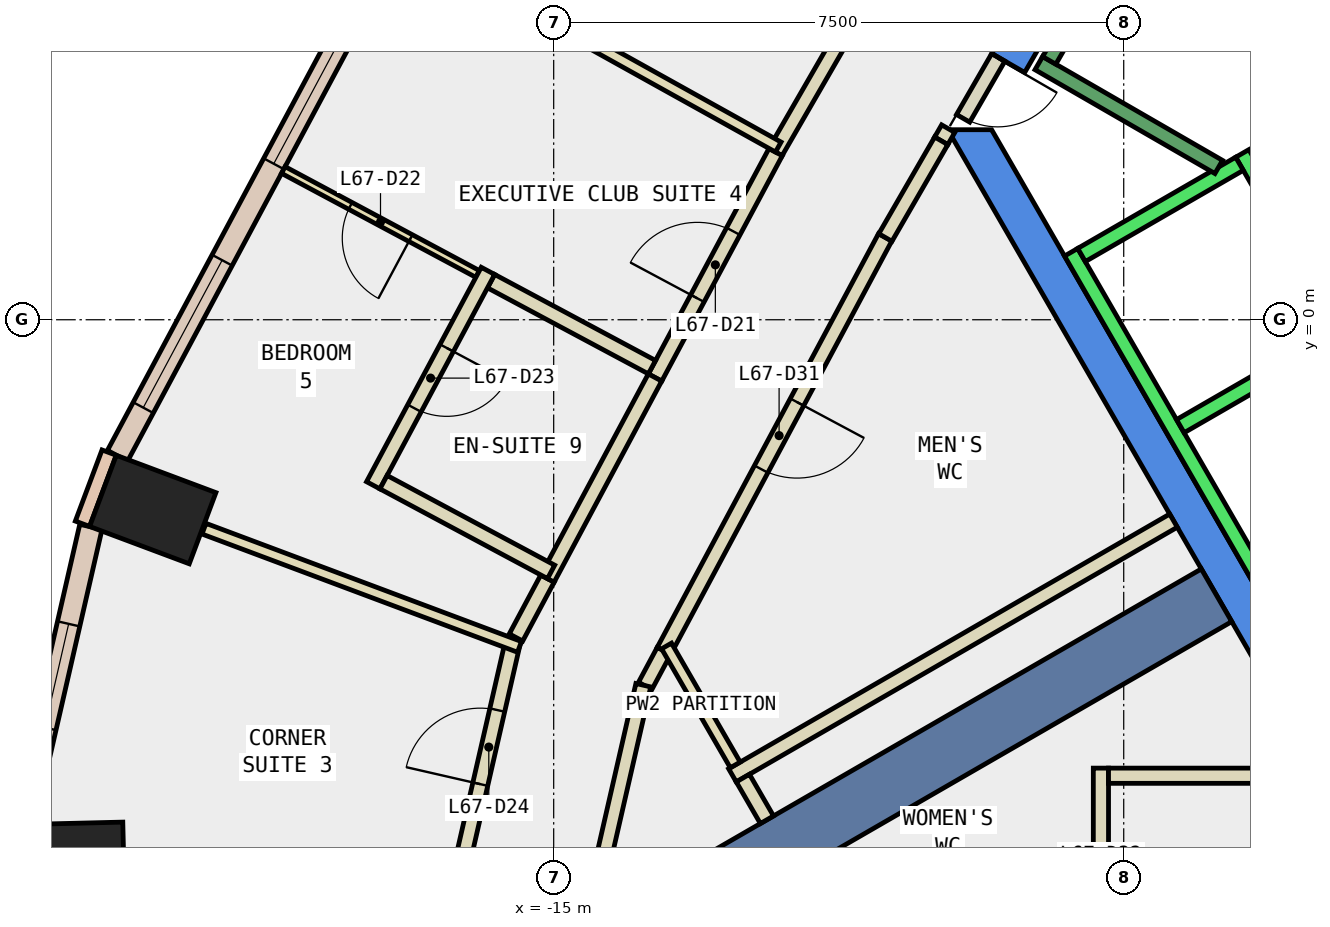
"""IFC4 building model, lengths in metres.
Left out: names, types, materials, properties, quantities, classifications, styles, units other than length and angle.
Written with IfcOpenShell. Run it as: python <this file> out.ifc"""

import sys

from ifc_helpers import new_model, si_unit, direction, frame, frame_2d, origin, origin_2d, place, context, subcontext, project, spatial, polyline, rectangle, outline, extrude, element, fill, save


model = new_model("IFC4")
c1 = context("Model", 3, precision=1e-05, world=origin(), true_north=direction((0.0, 1.0)))
c2 = subcontext(c1, "Body", "Model", "MODEL_VIEW")
j1 = project(units=[si_unit("LENGTHUNIT", "METRE"), si_unit("PLANEANGLEUNIT", "RADIAN")], contexts=[c1])
p1 = place(None, origin())
s1 = spatial("IfcSite", under=j1, at=p1, CompositionType="ELEMENT")
p2 = place(p1, origin())
s2 = spatial("IfcBuilding", under=s1, at=p2, CompositionType="ELEMENT")
p3 = place(p2, frame((0.0, 0.0, 290.0)))
s3 = spatial("IfcBuildingStorey", under=s2, at=p3, CompositionType="ELEMENT", Elevation=290.0)
for number, where, z_axis, x_axis in (
    (1, (-20.275, -2.497, -0.34), (0.0, 0.0, 1.0), (0.351, 0.936, 0.0)),
    (2, (-21.357, -7.126, -0.34), (0.0, 0.0, 1.0), (-0.024, 1.0, 0.0)),
):
    element("IfcColumn", number, at=place(p3, frame(where, z_axis=z_axis, x_axis=x_axis)), inside=s3, PredefinedType="COLUMN", context=c2, shape_type="SweptSolid", body=[
        extrude(rectangle(XDim=1.0, YDim=1.4, at=origin_2d()), origin(), (0.0, 0.0, 1.0), 3.6),
    ])
p4 = place(p3, frame((0.0, 0.0, -0.34)))
e3 = element("IfcWall", 3, at=p4, inside=s3, PredefinedType="SHEAR", context=c2, shape_type="SweptSolid", body=[
    extrude(outline(polyline([(-9.236, 3.502), (-8.803, 3.253), (-4.619, 10.5), (-4.907, 11.0), (-9.236, 3.502)])), origin(), (0.0, 0.0, 1.0), 3.6),
])
p5 = place(p3, frame((0.0, 0.0, -0.34)))
e4 = element("IfcWall", 4, at=p5, inside=s3, PredefinedType="SHEAR", context=c2, shape_type="SweptSolid", body=[
    extrude(outline(polyline([(-9.815, 2.5), (-4.907, -6.0), (-4.619, -5.5), (-9.238, 2.5), (-9.815, 2.5)])), origin(), (0.0, 0.0, 1.0), 3.6),
])
p6 = place(p3, frame((-6.279, -3.625, -0.34), z_axis=(0.0, 0.0, 1.0), x_axis=(-0.866017533419, -0.500013631625, 0.0)))
e5 = element("IfcWall", 5, at=p6, inside=s3, PredefinedType="SHEAR", context=c2, shape_type="SweptSolid", body=[
    extrude(rectangle(XDim=9.0, YDim=0.8, at=frame_2d((4.5, 0.0))), origin(), (0.0, 0.0, 1.0), 3.6),
])
p7 = place(p3, frame((-20.849, -1.748, 0.0), z_axis=(0.0, 0.0, 1.0), x_axis=(-0.350962844851, -0.936389385637, 0.0)))
e6 = element("IfcWall", 6, at=p7, inside=s3, PredefinedType="STANDARD", context=c2, shape_type="SweptSolid", body=[
    extrude(rectangle(XDim=1.0, YDim=0.2, at=frame_2d((0.5, 0.0))), origin(), (0.0, 0.0, 1.0), 3.26),
])
p8 = place(p3, frame((-17.306, 4.626, 0.0), z_axis=(0.0, 0.0, 1.0), x_axis=(-0.471789353675, -0.881711293882, 0.0)))
e7 = element("IfcWall", 7, at=p8, inside=s3, PredefinedType="STANDARD", context=c2, shape_type="SweptSolid", body=[
    extrude(rectangle(XDim=7.277, YDim=0.3, at=frame_2d((3.638, 0.0))), origin(), (0.0, 0.0, 1.0), 3.26),
])
p9 = place(p8, frame((0.719, 0.0, 0.9)))
e8 = element("IfcOpeningElement", 8, at=p9, cuts=e7, PredefinedType="OPENING", context=c2, shape_type="SweptSolid", body=[
    extrude(rectangle(XDim=2.2, YDim=2.0, at=frame_2d((1.1, 1.0))), frame((0.0, 0.16, 0.0), z_axis=(0.0, -1.0, 0.0), x_axis=(1.0, 0.0, 0.0)), (0.0, 0.0, 1.0), 0.32),
])
p10 = place(p8, frame((4.358, 0.0, 0.9)))
e9 = element("IfcOpeningElement", 9, at=p10, cuts=e7, PredefinedType="OPENING", context=c2, shape_type="SweptSolid", body=[
    extrude(rectangle(XDim=2.2, YDim=2.0, at=frame_2d((1.1, 1.0))), frame((0.0, 0.16, 0.0), z_axis=(0.0, -1.0, 0.0), x_axis=(1.0, 0.0, 0.0)), (0.0, 0.0, 1.0), 0.32),
])
p11 = place(p3, frame((-21.089, -2.725, 0.0), z_axis=(0.0, 0.0, 1.0), x_axis=(-0.223448307338, -0.974715781112, 0.0)))
e10 = element("IfcWall", 10, at=p11, inside=s3, PredefinedType="STANDARD", context=c2, shape_type="SweptSolid", body=[
    extrude(rectangle(XDim=4.019, YDim=0.3, at=frame_2d((2.009, 0.0))), origin(), (0.0, 0.0, 1.0), 3.26),
])
p12 = place(p11, frame((1.309, 0.0, 0.9)))
e11 = element("IfcOpeningElement", 11, at=p12, cuts=e10, PredefinedType="OPENING", context=c2, shape_type="SweptSolid", body=[
    extrude(rectangle(XDim=1.4, YDim=2.0, at=frame_2d((0.7, 1.0))), frame((0.0, 0.16, 0.0), z_axis=(0.0, -1.0, 0.0), x_axis=(1.0, 0.0, 0.0)), (0.0, 0.0, 1.0), 0.32),
])
p13 = place(p3, frame((-9.809, 2.514, 0.0), z_axis=(0.0, 0.0, 1.0), x_axis=(-0.497849076449, -0.867263683708, 0.0)))
e12 = element("IfcWall", 12, at=p13, inside=s3, PredefinedType="PARTITIONING", context=c2, shape_type="SweptSolid", body=[
    extrude(rectangle(XDim=0.184, YDim=0.2, at=frame_2d((0.092, 0.0))), origin(), (0.0, 0.0, 1.0), 2.4),
])
p14 = place(p3, frame((-10.639, 1.084, 0.0), z_axis=(0.0, 0.0, 1.0), x_axis=(-0.471696599276, -0.881760918975, 0.0)))
e13 = element("IfcWall", 13, at=p14, inside=s3, PredefinedType="PARTITIONING", context=c2, shape_type="SweptSolid", body=[
    extrude(rectangle(XDim=6.172, YDim=0.2, at=frame_2d((3.086, 0.0))), origin(), (0.0, 0.0, 1.0), 3.26),
])
p15 = place(p14, frame((2.458, 0.0, 0.0)))
e14 = element("IfcOpeningElement", 14, at=p15, cuts=e13, PredefinedType="OPENING", context=c2, shape_type="SweptSolid", body=[
    extrude(rectangle(XDim=1.0, YDim=2.1, at=frame_2d((0.5, 1.05))), frame((0.0, 0.11, 0.0), z_axis=(0.0, -1.0, 0.0), x_axis=(1.0, 0.0, 0.0)), (0.0, 0.0, 1.0), 0.22),
])
p16 = place(p3, frame((-13.55, -4.358, 0.0), z_axis=(0.0, 0.0, 1.0), x_axis=(-0.472169364753, -0.881507850781, 0.0)))
e15 = element("IfcWall", 15, at=p16, inside=s3, PredefinedType="PARTITIONING", context=c2, shape_type="SweptSolid", body=[
    extrude(rectangle(XDim=0.521, YDim=0.2, at=frame_2d((0.26, 0.0))), origin(), (0.0, 0.0, 1.0), 3.26),
])
p17 = place(p3, frame((-13.821, -4.808, 0.0), z_axis=(0.0, 0.0, 1.0), x_axis=(-0.223248099856, -0.97476165595, 0.0)))
e16 = element("IfcWall", 16, at=p17, inside=s3, PredefinedType="PARTITIONING", context=c2, shape_type="SweptSolid", body=[
    extrude(rectangle(XDim=2.302, YDim=0.2, at=frame_2d((1.151, 0.0))), origin(), (0.0, 0.0, 1.0), 3.26),
])
p18 = place(p3, frame((-12.082, 2.207, 0.0), z_axis=(0.0, 0.0, 1.0), x_axis=(0.500123454404, 0.865954115618, 0.0)))
e17 = element("IfcWall", 17, at=p18, inside=s3, PredefinedType="PARTITIONING", context=c2, shape_type="SweptSolid", body=[
    extrude(rectangle(XDim=5.885, YDim=0.2, at=frame_2d((2.942, 0.0))), origin(), (0.0, 0.0, 1.0), 3.26),
])
p19 = place(p18, frame((2.493, 0.0, 0.0)))
e18 = element("IfcOpeningElement", 18, at=p19, cuts=e17, PredefinedType="OPENING", context=c2, shape_type="SweptSolid", body=[
    extrude(rectangle(XDim=1.0, YDim=2.1, at=frame_2d((0.5, 1.05))), frame((0.0, 0.11, 0.0), z_axis=(0.0, -1.0, 0.0), x_axis=(1.0, 0.0, 0.0)), (0.0, 0.0, 1.0), 0.22),
])
p20 = place(p3, frame((-13.666, -0.76, 0.0), z_axis=(0.0, 0.0, 1.0), x_axis=(0.471643060173, 0.881789557543, 0.0)))
e19 = element("IfcWall", 19, at=p20, inside=s3, PredefinedType="PARTITIONING", context=c2, shape_type="SweptSolid", body=[
    extrude(rectangle(XDim=3.363, YDim=0.2, at=frame_2d((1.681, 0.0))), origin(), (0.0, 0.0, 1.0), 3.26),
])
p21 = place(p20, frame((1.181, 0.0, 0.0)))
e20 = element("IfcOpeningElement", 20, at=p21, cuts=e19, PredefinedType="OPENING", context=c2, shape_type="SweptSolid", body=[
    extrude(rectangle(XDim=1.0, YDim=2.1, at=frame_2d((0.5, 1.05))), frame((0.0, 0.11, 0.0), z_axis=(0.0, -1.0, 0.0), x_axis=(1.0, 0.0, 0.0)), (0.0, 0.0, 1.0), 0.22),
])
p22 = place(p3, frame((-15.496, -4.18, 0.0), z_axis=(0.0, 0.0, 1.0), x_axis=(0.471280380621, 0.881983448167, 0.0)))
e21 = element("IfcWall", 21, at=p22, inside=s3, PredefinedType="PARTITIONING", context=c2, shape_type="SweptSolid", body=[
    extrude(rectangle(XDim=0.879, YDim=0.2, at=frame_2d((0.439, 0.0))), origin(), (0.0, 0.0, 1.0), 3.26),
])
p23 = place(p3, frame((-15.082, -3.405, 0.0), z_axis=(0.0, 0.0, 1.0), x_axis=(0.471719946084, 0.88174842924, 0.0)))
e22 = element("IfcWall", 22, at=p23, inside=s3, PredefinedType="PARTITIONING", context=c2, shape_type="SweptSolid", body=[
    extrude(rectangle(XDim=3.0, YDim=0.2, at=frame_2d((1.5, 0.0))), origin(), (0.0, 0.0, 1.0), 3.26),
])
p24 = place(p3, frame((-16.192, -7.098, 0.0), z_axis=(0.0, 0.0, 1.0), x_axis=(0.22330023395, 0.974749714295, 0.0)))
e23 = element("IfcWall", 23, at=p24, inside=s3, PredefinedType="PARTITIONING", context=c2, shape_type="SweptSolid", body=[
    extrude(rectangle(XDim=2.928, YDim=0.2, at=frame_2d((1.464, 0.0))), origin(), (0.0, 0.0, 1.0), 3.26),
])
p25 = place(p24, frame((1.014, 0.0, 0.0)))
e24 = element("IfcOpeningElement", 24, at=p25, cuts=e23, PredefinedType="OPENING", context=c2, shape_type="SweptSolid", body=[
    extrude(rectangle(XDim=1.0, YDim=2.1, at=frame_2d((0.5, 1.05))), frame((0.0, 0.11, 0.0), z_axis=(0.0, -1.0, 0.0), x_axis=(1.0, 0.0, 0.0)), (0.0, 0.0, 1.0), 0.22),
])
p26 = place(p3, frame((-7.8, -9.775, 0.0), z_axis=(0.0, 0.0, 1.0), x_axis=(0.0, 1.0, 0.0)))
e25 = element("IfcWall", 25, at=p26, inside=s3, PredefinedType="PARTITIONING", context=c2, shape_type="SweptSolid", body=[
    extrude(rectangle(XDim=3.876, YDim=0.2, at=frame_2d((1.938, 0.0))), origin(), (0.0, 0.0, 1.0), 3.26),
])
p27 = place(p26, frame((1.438, 0.0, 0.0)))
e26 = element("IfcOpeningElement", 26, at=p27, cuts=e25, PredefinedType="OPENING", context=c2, shape_type="SweptSolid", body=[
    extrude(rectangle(XDim=1.0, YDim=2.1, at=frame_2d((0.5, 1.05))), frame((0.0, 0.11, 0.0), z_axis=(0.0, -1.0, 0.0), x_axis=(1.0, 0.0, 0.0)), (0.0, 0.0, 1.0), 0.22),
])
p28 = place(p3, frame((-7.7, -5.999, 0.0), z_axis=(0.0, 0.0, 1.0), x_axis=(1.0, 0.0, 0.0)))
e27 = element("IfcWall", 27, at=p28, inside=s3, PredefinedType="PARTITIONING", context=c2, shape_type="SweptSolid", body=[
    extrude(rectangle(XDim=2.792, YDim=0.2, at=frame_2d((1.396, 0.0))), origin(), (0.0, 0.0, 1.0), 3.26),
])
p29 = place(p3, frame((-6.845, -2.643, 0.0), z_axis=(0.0, 0.0, 1.0), x_axis=(-0.865994457699, -0.500053596362, 0.0)))
e28 = element("IfcWall", 28, at=p29, inside=s3, PredefinedType="PARTITIONING", context=c2, shape_type="SweptSolid", body=[
    extrude(rectangle(XDim=6.701, YDim=0.2, at=frame_2d((3.351, 0.0))), origin(), (0.0, 0.0, 1.0), 3.26),
])
p30 = place(p3, frame((-12.611, -5.857, 0.0), z_axis=(0.0, 0.0, 1.0), x_axis=(-0.500120037633, 0.865956088932, 0.0)))
e29 = element("IfcWall", 29, at=p30, inside=s3, PredefinedType="PARTITIONING", context=c2, shape_type="SweptSolid", body=[
    extrude(rectangle(XDim=1.807, YDim=0.15, at=frame_2d((0.904, 0.0))), origin(), (0.0, 0.0, 1.0), 3.26),
])
p31 = place(p3, frame((-12.045, 2.272, 0.0), z_axis=(0.0, 0.0, 1.0), x_axis=(-0.873982340973, 0.485957680943, 0.0)))
e30 = element("IfcWall", 30, at=p31, inside=s3, PredefinedType="PARTITIONING", context=c2, shape_type="SweptSolid", body=[
    extrude(rectangle(XDim=4.28, YDim=0.15, at=frame_2d((2.14, 0.0))), origin(), (0.0, 0.0, 1.0), 3.26),
])
p32 = place(p3, frame((-16.0, 0.602, 0.0), z_axis=(0.0, 0.0, 1.0), x_axis=(-0.881743923375, 0.47172836844, 0.0)))
e31 = element("IfcWall", 31, at=p32, inside=s3, PredefinedType="PARTITIONING", context=c2, shape_type="SweptSolid", body=[
    extrude(rectangle(XDim=2.9, YDim=0.1, at=frame_2d((1.45, 0.0))), origin(), (0.0, 0.0, 1.0), 3.26),
])
p33 = place(p32, frame((1.0, 0.0, 0.0)))
e32 = element("IfcOpeningElement", 32, at=p33, cuts=e31, PredefinedType="OPENING", context=c2, shape_type="SweptSolid", body=[
    extrude(rectangle(XDim=0.9, YDim=2.1, at=frame_2d((0.45, 1.05))), frame((0.0, 0.06, 0.0), z_axis=(0.0, -1.0, 0.0), x_axis=(1.0, 0.0, 0.0)), (0.0, 0.0, 1.0), 0.12),
])
p34 = place(p3, frame((-13.707, -0.624, 0.0), z_axis=(0.0, 0.0, 1.0), x_axis=(-0.881825950813, 0.471575012562, 0.0)))
e33 = element("IfcWall", 33, at=p34, inside=s3, PredefinedType="PARTITIONING", context=c2, shape_type="SweptSolid", body=[
    extrude(rectangle(XDim=2.401, YDim=0.2, at=frame_2d((1.2, 0.0))), origin(), (0.0, 0.0, 1.0), 3.26),
])
p35 = place(p3, frame((-15.865, 0.643, 0.0), z_axis=(0.0, 0.0, 1.0), x_axis=(-0.471677088066, -0.881771356188, 0.0)))
e34 = element("IfcWall", 34, at=p35, inside=s3, PredefinedType="PARTITIONING", context=c2, shape_type="SweptSolid", body=[
    extrude(rectangle(XDim=3.199, YDim=0.2, at=frame_2d((1.6, 0.0))), origin(), (0.0, 0.0, 1.0), 3.26),
])
p36 = place(p35, frame((1.15, 0.0, 0.0)))
e35 = element("IfcOpeningElement", 35, at=p36, cuts=e34, PredefinedType="OPENING", context=c2, shape_type="SweptSolid", body=[
    extrude(rectangle(XDim=0.9, YDim=2.1, at=frame_2d((0.45, 1.05))), frame((0.0, 0.11, 0.0), z_axis=(0.0, -1.0, 0.0), x_axis=(1.0, 0.0, 0.0)), (0.0, 0.0, 1.0), 0.22),
])
p37 = place(p3, frame((-17.239, -2.137, 0.0), z_axis=(0.0, 0.0, 1.0), x_axis=(0.881706262609, -0.471798756332, 0.0)))
e36 = element("IfcWall", 36, at=p37, inside=s3, PredefinedType="PARTITIONING", context=c2, shape_type="SweptSolid", body=[
    extrude(rectangle(XDim=2.501, YDim=0.2, at=frame_2d((1.25, 0.0))), origin(), (0.0, 0.0, 1.0), 3.26),
])
p38 = place(p3, frame((-15.45, -4.304, 0.0), z_axis=(0.0, 0.0, 1.0), x_axis=(-0.936458128132, 0.350779381172, 0.0)))
e37 = element("IfcWall", 37, at=p38, inside=s3, PredefinedType="PARTITIONING", context=c2, shape_type="SweptSolid", body=[
    extrude(rectangle(XDim=4.433, YDim=0.15, at=frame_2d((2.216, 0.0))), origin(), (0.0, 0.0, 1.0), 3.26),
])
p39 = place(p3, frame((-9.15, 3.452, 0.0), z_axis=(0.0, 0.0, 1.0), x_axis=(-0.500079945886, -0.865979242085, 0.0)))
e38 = element("IfcWall", 38, at=p39, inside=s3, PredefinedType="PARTITIONING", context=c2, shape_type="SweptSolid", body=[
    extrude(rectangle(XDim=0.926, YDim=0.2, at=frame_2d((0.463, 0.0))), origin(), (0.0, 0.0, 1.0), 2.4),
])
p40 = place(p39, frame((0.017, 0.0, 0.0)))
e39 = element("IfcOpeningElement", 39, at=p40, cuts=e38, PredefinedType="OPENING", context=c2, shape_type="SweptSolid", body=[
    extrude(rectangle(XDim=0.9, YDim=2.1, at=frame_2d((0.45, 1.05))), frame((0.0, 0.11, 0.0), z_axis=(0.0, -1.0, 0.0), x_axis=(1.0, 0.0, 0.0)), (0.0, 0.0, 1.0), 0.22),
])
p41 = place(p3, frame((-12.194, -6.578, 0.0), z_axis=(0.0, 0.0, 1.0), x_axis=(-0.500701704226, 0.865619895442, 0.0)))
e40 = element("IfcWall", 40, at=p41, inside=s3, PredefinedType="PARTITIONING", context=c2, shape_type="SweptSolid", body=[
    extrude(rectangle(XDim=0.633, YDim=0.2, at=frame_2d((0.316, 0.0))), origin(), (0.0, 0.0, 1.0), 3.26),
])
p42 = place(p3, frame((-9.901, 2.354, 0.0), z_axis=(0.0, 0.0, 1.0), x_axis=(-0.500374498448, -0.865809079014, 0.0)))
e41 = element("IfcWall", 41, at=p42, inside=s3, PredefinedType="PARTITIONING", context=c2, shape_type="SweptSolid", body=[
    extrude(rectangle(XDim=1.469, YDim=0.2, at=frame_2d((0.734, 0.0))), origin(), (0.0, 0.0, 1.0), 3.26),
])
p43 = place(p3, frame((-5.94, 2.188, 0.0), z_axis=(0.0, 0.0, 1.0), x_axis=(0.500034260056, -0.866005622828, 0.0)))
e42 = element("IfcWall", 42, at=p43, inside=s3, PredefinedType="STANDARD", context=c2, shape_type="SweptSolid", body=[
    extrude(rectangle(XDim=5.399, YDim=0.2, at=frame_2d((2.7, 0.0))), origin(), (0.0, 0.0, 1.0), 3.26),
])
p44 = place(p43, frame((3.075, 0.0, 0.0)))
e43 = element("IfcOpeningElement", 43, at=p44, cuts=e42, PredefinedType="OPENING", context=c2, shape_type="SweptSolid", body=[
    extrude(rectangle(XDim=1.1, YDim=2.1, at=frame_2d((0.55, 1.05))), frame((0.0, 0.11, 0.0), z_axis=(0.0, -1.0, 0.0), x_axis=(1.0, 0.0, 0.0)), (0.0, 0.0, 1.0), 0.22),
])
p45 = place(p43, frame((1.225, 0.0, 0.0)))
e44 = element("IfcOpeningElement", 44, at=p45, cuts=e42, PredefinedType="OPENING", context=c2, shape_type="SweptSolid", body=[
    extrude(rectangle(XDim=1.1, YDim=2.1, at=frame_2d((0.55, 1.05))), frame((0.0, 0.11, 0.0), z_axis=(0.0, -1.0, 0.0), x_axis=(1.0, 0.0, 0.0)), (0.0, 0.0, 1.0), 0.22),
])
p46 = place(p3, frame((-8.192, 0.888, 0.0), z_axis=(0.0, 0.0, 1.0), x_axis=(0.500034260056, -0.866005622828, 0.0)))
e45 = element("IfcWall", 45, at=p46, inside=s3, PredefinedType="STANDARD", context=c2, shape_type="SweptSolid", body=[
    extrude(rectangle(XDim=5.399, YDim=0.2, at=frame_2d((2.7, 0.0))), origin(), (0.0, 0.0, 1.0), 3.26),
])
for number, where, z_axis, x_axis in (
    (46, (-5.977, 2.052, 0.0), (0.0, 0.0, 1.0), (-0.866, -0.5, 0.0)),
    (47, (-4.677, -0.2, 0.0), (0.0, 0.0, 1.0), (-0.866, -0.5, 0.0)),
):
    element("IfcWall", number, at=place(p3, frame(where, z_axis=z_axis, x_axis=x_axis)), inside=s3, PredefinedType="STANDARD", context=c2, shape_type="SweptSolid", body=[
        extrude(rectangle(XDim=2.399, YDim=0.2, at=frame_2d((1.2, 0.0))), origin(), (0.0, 0.0, 1.0), 3.26),
    ])
p47 = place(p3, frame((-6.25, 2.01, 0.0), z_axis=(0.0, 0.0, 1.0), x_axis=(-0.86611865017, 0.499838457731, 0.0)))
e48 = element("IfcWall", 48, at=p47, inside=s3, PredefinedType="STANDARD", context=c2, shape_type="SweptSolid", body=[
    extrude(rectangle(XDim=2.733, YDim=0.2, at=frame_2d((1.366, 0.0))), origin(), (0.0, 0.0, 1.0), 3.26),
])
p48 = place(p3, frame((-5.03, 9.388, 0.0), z_axis=(0.0, 0.0, 1.0), x_axis=(-0.499978703459, -0.866037698999, 0.0)))
e49 = element("IfcWall", 49, at=p48, inside=s3, PredefinedType="STANDARD", context=c2, shape_type="SweptSolid", body=[
    extrude(rectangle(XDim=6.9, YDim=0.2, at=frame_2d((3.45, 0.0))), origin(), (0.0, 0.0, 1.0), 3.26),
])
p49 = place(p9, origin())
e50 = element("IfcWindow", 50, at=p49, inside=s3, PartitioningType="SINGLE_PANEL", PredefinedType="WINDOW", context=c2, shape_type="SweptSolid", body=[
    extrude(rectangle(XDim=2.2, YDim=2.0, at=frame_2d((1.1, 1.0))), frame((0.0, 0.03, 0.0), z_axis=(0.0, -1.0, 0.0), x_axis=(1.0, 0.0, 0.0)), (0.0, 0.0, 1.0), 0.06),
])
fill(e8, e50)
p50 = place(p10, origin())
e51 = element("IfcWindow", 51, at=p50, inside=s3, PartitioningType="SINGLE_PANEL", PredefinedType="WINDOW", context=c2, shape_type="SweptSolid", body=[
    extrude(rectangle(XDim=2.2, YDim=2.0, at=frame_2d((1.1, 1.0))), frame((0.0, 0.03, 0.0), z_axis=(0.0, -1.0, 0.0), x_axis=(1.0, 0.0, 0.0)), (0.0, 0.0, 1.0), 0.06),
])
fill(e9, e51)
p51 = place(p12, origin())
e52 = element("IfcWindow", 52, at=p51, inside=s3, PartitioningType="SINGLE_PANEL", PredefinedType="WINDOW", context=c2, shape_type="SweptSolid", body=[
    extrude(rectangle(XDim=1.4, YDim=2.0, at=frame_2d((0.7, 1.0))), frame((0.0, 0.03, 0.0), z_axis=(0.0, -1.0, 0.0), x_axis=(1.0, 0.0, 0.0)), (0.0, 0.0, 1.0), 0.06),
])
fill(e11, e52)
p52 = place(p21, origin())
e53 = element("IfcDoor", 53, at=p52, inside=s3, OperationType="SINGLE_SWING_LEFT", PredefinedType="DOOR", context=c2, shape_type="SweptSolid", body=[
    extrude(rectangle(XDim=1.0, YDim=2.1, at=frame_2d((0.5, 1.05))), frame((0.0, 0.025, 0.0), z_axis=(0.0, -1.0, 0.0), x_axis=(1.0, 0.0, 0.0)), (0.0, 0.0, 1.0), 0.05),
])
fill(e20, e53)
p53 = place(p33, origin())
e54 = element("IfcDoor", 54, at=p53, inside=s3, OperationType="SINGLE_SWING_LEFT", PredefinedType="DOOR", context=c2, shape_type="SweptSolid", body=[
    extrude(rectangle(XDim=0.9, YDim=2.1, at=frame_2d((0.45, 1.05))), frame((0.0, 0.025, 0.0), z_axis=(0.0, -1.0, 0.0), x_axis=(1.0, 0.0, 0.0)), (0.0, 0.0, 1.0), 0.05),
])
fill(e32, e54)
p54 = place(p36, origin())
e55 = element("IfcDoor", 55, at=p54, inside=s3, OperationType="SINGLE_SWING_LEFT", PredefinedType="DOOR", context=c2, shape_type="SweptSolid", body=[
    extrude(rectangle(XDim=0.9, YDim=2.1, at=frame_2d((0.45, 1.05))), frame((0.0, 0.025, 0.0), z_axis=(0.0, -1.0, 0.0), x_axis=(1.0, 0.0, 0.0)), (0.0, 0.0, 1.0), 0.05),
])
fill(e35, e55)
p55 = place(p25, origin())
e56 = element("IfcDoor", 56, at=p55, inside=s3, OperationType="SINGLE_SWING_LEFT", PredefinedType="DOOR", context=c2, shape_type="SweptSolid", body=[
    extrude(rectangle(XDim=1.0, YDim=2.1, at=frame_2d((0.5, 1.05))), frame((0.0, 0.025, 0.0), z_axis=(0.0, -1.0, 0.0), x_axis=(1.0, 0.0, 0.0)), (0.0, 0.0, 1.0), 0.05),
])
fill(e24, e56)
p56 = place(p15, origin())
e57 = element("IfcDoor", 57, at=p56, inside=s3, OperationType="SINGLE_SWING_LEFT", PredefinedType="DOOR", context=c2, shape_type="SweptSolid", body=[
    extrude(rectangle(XDim=1.0, YDim=2.1, at=frame_2d((0.5, 1.05))), frame((0.0, 0.025, 0.0), z_axis=(0.0, -1.0, 0.0), x_axis=(1.0, 0.0, 0.0)), (0.0, 0.0, 1.0), 0.05),
])
fill(e14, e57)
p57 = place(p40, origin())
e58 = element("IfcDoor", 58, at=p57, inside=s3, OperationType="SINGLE_SWING_LEFT", PredefinedType="DOOR", context=c2, shape_type="SweptSolid", body=[
    extrude(rectangle(XDim=0.9, YDim=2.1, at=frame_2d((0.45, 1.05))), frame((0.0, 0.025, 0.0), z_axis=(0.0, -1.0, 0.0), x_axis=(1.0, 0.0, 0.0)), (0.0, 0.0, 1.0), 0.05),
])
fill(e39, e58)
save(model, sys.argv[1])
